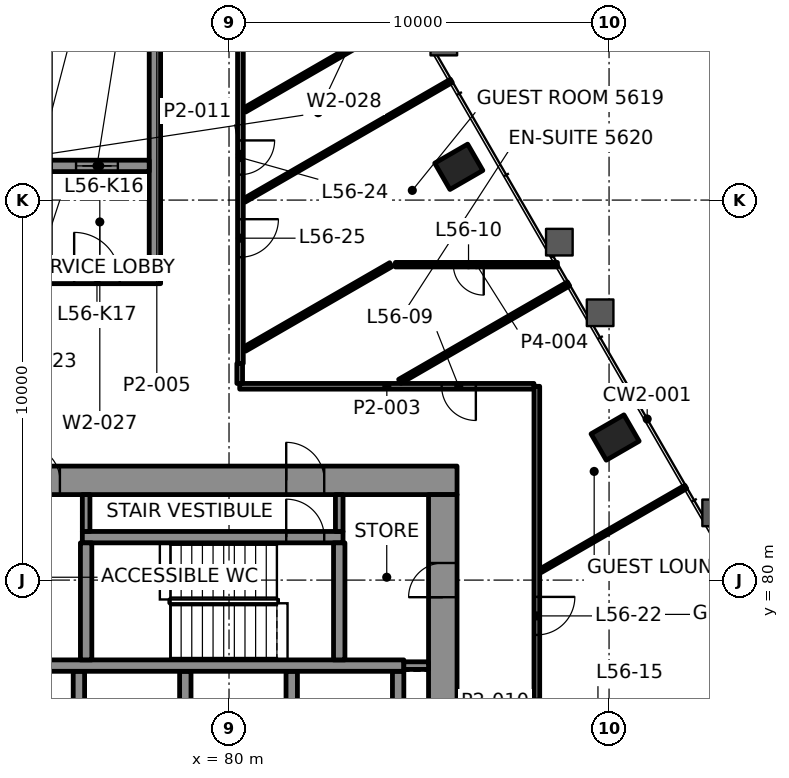
"""IFC4 building model, lengths in metres.
Left out: names, types, materials, properties, quantities, classifications, styles, units other than length and angle.
Written with IfcOpenShell. Run it as: python <this file> out.ifc"""

import sys

from ifc_helpers import new_model, si_unit, direction, frame, frame_2d, origin, origin_2d, place, context, subcontext, project, spatial, rectangle, hollow_rectangle, extrude, element, fill, save


model = new_model("IFC4")
c1 = context("Model", 3, precision=1e-05, world=origin(), true_north=direction((0.0, 1.0)))
c2 = subcontext(c1, "Body", "Model", "MODEL_VIEW")
j1 = project(units=[si_unit("LENGTHUNIT", "METRE"), si_unit("PLANEANGLEUNIT", "RADIAN")], contexts=[c1])
p1 = place(None, origin())
s1 = spatial("IfcSite", under=j1, at=p1, CompositionType="ELEMENT")
p2 = place(p1, origin())
s2 = spatial("IfcBuilding", under=s1, at=p2, CompositionType="ELEMENT")
p3 = place(p2, frame((0.0, 0.0, 237.7)))
s3 = spatial("IfcBuildingStorey", under=s2, at=p3, CompositionType="ELEMENT", Elevation=237.7)
for number, where, z_axis, x_axis in (
    (1, (90.159, 83.752, -0.0), (0.0, 0.0, 1.0), (-0.5, 0.866, 0.0)),
    (2, (86.046, 90.875, -0.0), (0.0, 0.0, 1.0), (-0.5, 0.866, 0.0)),
):
    element("IfcColumn", number, at=place(p3, frame(where, z_axis=z_axis, x_axis=x_axis)), inside=s3, PredefinedType="COLUMN", context=c2, shape_type="SweptSolid", body=[
        extrude(hollow_rectangle(XDim=0.8, YDim=1.0, WallThickness=0.05, at=origin_2d()), origin(), (0.0, 0.0, 1.0), 3.9),
    ])
p4 = place(p3, frame((64.0, 82.625, 0.0), z_axis=(0.0, 0.0, 1.0), x_axis=(1.0, 0.0, 0.0)))
e3 = element("IfcWall", 3, at=p4, inside=s3, PredefinedType="SHEAR", context=c2, shape_type="SweptSolid", body=[
    extrude(rectangle(XDim=22.0, YDim=0.75, at=frame_2d((11.0, 0.0))), origin(), (0.0, 0.0, 1.0), 3.6),
])
p5 = place(p4, frame((3.695, 0.0, 0.0)))
e4 = element("IfcOpeningElement", 4, at=p5, cuts=e3, PredefinedType="OPENING", context=c2, shape_type="SweptSolid", body=[
    extrude(rectangle(XDim=1.0, YDim=2.1, at=frame_2d((0.5, 1.05))), frame((0.0, 0.385, 0.0), z_axis=(0.0, -1.0, 0.0), x_axis=(1.0, 0.0, 0.0)), (0.0, 0.0, 1.0), 0.77),
])
p6 = place(p4, frame((17.505, 0.0, 0.0)))
e5 = element("IfcOpeningElement", 5, at=p6, cuts=e3, PredefinedType="OPENING", context=c2, shape_type="SweptSolid", body=[
    extrude(rectangle(XDim=1.0, YDim=2.1, at=frame_2d((0.5, 1.05))), frame((0.0, 0.385, 0.0), z_axis=(0.0, -1.0, 0.0), x_axis=(1.0, 0.0, 0.0)), (0.0, 0.0, 1.0), 0.77),
])
p7 = place(p4, frame((10.65, 0.0, 0.0)))
e6 = element("IfcOpeningElement", 6, at=p7, cuts=e3, PredefinedType="OPENING", context=c2, shape_type="SweptSolid", body=[
    extrude(rectangle(XDim=0.9, YDim=2.1, at=frame_2d((0.45, 1.05))), frame((0.0, 0.385, 0.0), z_axis=(0.0, -1.0, 0.0), x_axis=(1.0, 0.0, 0.0)), (0.0, 0.0, 1.0), 0.77),
])
p8 = place(p3, frame((85.625, 67.75, 0.0), z_axis=(0.0, 0.0, 1.0), x_axis=(0.0, 1.0, 0.0)))
e7 = element("IfcWall", 7, at=p8, inside=s3, PredefinedType="SHEAR", context=c2, shape_type="SweptSolid", body=[
    extrude(rectangle(XDim=14.5, YDim=0.75, at=frame_2d((7.25, 0.0))), origin(), (0.0, 0.0, 1.0), 3.6),
])
p9 = place(p8, frame((4.65, 0.0, 0.0)))
e8 = element("IfcOpeningElement", 8, at=p9, cuts=e7, PredefinedType="OPENING", context=c2, shape_type="SweptSolid", body=[
    extrude(rectangle(XDim=1.8, YDim=2.1, at=frame_2d((0.9, 1.05))), frame((0.0, 0.385, 0.0), z_axis=(0.0, -1.0, 0.0), x_axis=(1.0, 0.0, 0.0)), (0.0, 0.0, 1.0), 0.77),
])
p10 = place(p8, frame((11.8, 0.0, 0.0)))
e9 = element("IfcOpeningElement", 9, at=p10, cuts=e7, PredefinedType="OPENING", context=c2, shape_type="SweptSolid", body=[
    extrude(rectangle(XDim=0.9, YDim=2.1, at=frame_2d((0.45, 1.05))), frame((0.0, 0.385, 0.0), z_axis=(0.0, -1.0, 0.0), x_axis=(1.0, 0.0, 0.0)), (0.0, 0.0, 1.0), 0.77),
])
for number, where, z_axis, x_axis in (
    (10, (76.05, 75.0, 0.0), (0.0, 0.0, 1.0), (0.0, 1.0, 0.0)),
    (11, (78.85, 75.0, 0.0), (0.0, 0.0, 1.0), (0.0, 1.0, 0.0)),
    (12, (81.65, 75.0, 0.0), (0.0, 0.0, 1.0), (0.0, 1.0, 0.0)),
    (13, (84.45, 75.0, 0.0), (0.0, 0.0, 1.0), (0.0, 1.0, 0.0)),
):
    element("IfcWall", number, at=place(p3, frame(where, z_axis=z_axis, x_axis=x_axis)), inside=s3, PredefinedType="SHEAR", context=c2, shape_type="SweptSolid", body=[
        extrude(rectangle(XDim=2.6, YDim=0.3, at=frame_2d((1.3, 0.0))), origin(), (0.0, 0.0, 1.0), 3.6),
    ])
p11 = place(p3, frame((67.15, 77.75, 0.0), z_axis=(0.0, 0.0, 1.0), x_axis=(1.0, 0.0, 0.0)))
e14 = element("IfcWall", 14, at=p11, inside=s3, PredefinedType="SHEAR", context=c2, shape_type="SweptSolid", body=[
    extrude(rectangle(XDim=17.45, YDim=0.3, at=frame_2d((8.725, 0.0))), origin(), (0.0, 0.0, 1.0), 3.6),
])
p12 = place(p11, frame((0.545, 0.0, 0.0)))
e15 = element("IfcOpeningElement", 15, at=p12, cuts=e14, PredefinedType="OPENING", context=c2, shape_type="SweptSolid", body=[
    extrude(rectangle(XDim=1.0, YDim=2.1, at=frame_2d((0.5, 1.05))), frame((0.0, 0.16, 0.0), z_axis=(0.0, -1.0, 0.0), x_axis=(1.0, 0.0, 0.0)), (0.0, 0.0, 1.0), 0.32),
])
p13 = place(p3, frame((76.14, 81.13, 0.0), z_axis=(0.0, 0.0, 1.0), x_axis=(1.0, 0.0, 0.0)))
e16 = element("IfcWall", 16, at=p13, inside=s3, PredefinedType="SHEAR", context=c2, shape_type="SweptSolid", body=[
    extrude(rectangle(XDim=6.86, YDim=0.3, at=frame_2d((3.43, 0.0))), origin(), (0.0, 0.0, 1.0), 3.6),
])
p14 = place(p13, frame((5.365, 0.0, 0.0)))
e17 = element("IfcOpeningElement", 17, at=p14, cuts=e16, PredefinedType="OPENING", context=c2, shape_type="SweptSolid", body=[
    extrude(rectangle(XDim=1.0, YDim=2.1, at=frame_2d((0.5, 1.05))), frame((0.0, 0.16, 0.0), z_axis=(0.0, -1.0, 0.0), x_axis=(1.0, 0.0, 0.0)), (0.0, 0.0, 1.0), 0.32),
])
for number, where, z_axis, x_axis in (
    (18, (76.24, 77.9, 0.0), (0.0, 0.0, 1.0), (0.0, 1.0, 0.0)),
    (19, (82.9, 77.9, 0.0), (0.0, 0.0, 1.0), (0.0, 1.0, 0.0)),
):
    element("IfcWall", number, at=place(p3, frame(where, z_axis=z_axis, x_axis=x_axis)), inside=s3, PredefinedType="SHEAR", context=c2, shape_type="SweptSolid", body=[
        extrude(rectangle(XDim=3.08, YDim=0.3, at=frame_2d((1.54, 0.0))), origin(), (0.0, 0.0, 1.0), 3.6),
    ])
p15 = place(p3, frame((71.8, 87.95, 0.0), z_axis=(0.0, 0.0, 1.0), x_axis=(1.0, 0.0, 0.0)))
e20 = element("IfcWall", 20, at=p15, inside=s3, PredefinedType="SHEAR", context=c2, shape_type="SweptSolid", body=[
    extrude(rectangle(XDim=6.4, YDim=0.3, at=frame_2d((3.2, 0.0))), origin(), (0.0, 0.0, 1.0), 3.6),
])
p16 = place(p15, frame((1.325, 0.0, 0.0)))
e21 = element("IfcOpeningElement", 21, at=p16, cuts=e20, PredefinedType="OPENING", context=c2, shape_type="SweptSolid", body=[
    extrude(rectangle(XDim=1.0, YDim=2.1, at=frame_2d((0.5, 1.05))), frame((0.0, 0.16, 0.0), z_axis=(0.0, -1.0, 0.0), x_axis=(1.0, 0.0, 0.0)), (0.0, 0.0, 1.0), 0.32),
])
p17 = place(p15, frame((4.125, 0.0, 0.0)))
e22 = element("IfcOpeningElement", 22, at=p17, cuts=e20, PredefinedType="OPENING", context=c2, shape_type="SweptSolid", body=[
    extrude(rectangle(XDim=1.2, YDim=2.1, at=frame_2d((0.6, 1.05))), frame((0.0, 0.16, 0.0), z_axis=(0.0, -1.0, 0.0), x_axis=(1.0, 0.0, 0.0)), (0.0, 0.0, 1.0), 0.32),
])
p18 = place(p3, frame((78.05, 88.1, 0.0), z_axis=(0.0, 0.0, 1.0), x_axis=(0.0, 1.0, 0.0)))
e23 = element("IfcWall", 23, at=p18, inside=s3, PredefinedType="SHEAR", context=c2, shape_type="SweptSolid", body=[
    extrude(rectangle(XDim=6.2, YDim=0.3, at=frame_2d((3.1, 0.0))), origin(), (0.0, 0.0, 1.0), 3.6),
])
p19 = place(p3, frame((75.3, 90.9, 0.0), z_axis=(0.0, 0.0, 1.0), x_axis=(1.0, 0.0, 0.0)))
e24 = element("IfcWall", 24, at=p19, inside=s3, PredefinedType="SHEAR", context=c2, shape_type="SweptSolid", body=[
    extrude(rectangle(XDim=2.6, YDim=0.3, at=frame_2d((1.3, 0.0))), origin(), (0.0, 0.0, 1.0), 3.6),
])
p20 = place(p19, frame((0.675, 0.0, 0.0)))
e25 = element("IfcOpeningElement", 25, at=p20, cuts=e24, PredefinedType="OPENING", context=c2, shape_type="SweptSolid", body=[
    extrude(rectangle(XDim=1.1, YDim=2.1, at=frame_2d((0.55, 1.05))), frame((0.0, 0.16, 0.0), z_axis=(0.0, -1.0, 0.0), x_axis=(1.0, 0.0, 0.0)), (0.0, 0.0, 1.0), 0.32),
])
p21 = place(p3, frame((88.024, 85.1, 0.0), z_axis=(0.0, 0.0, 1.0), x_axis=(-1.0, 0.0, 0.0)))
e26 = element("IfcWall", 26, at=p21, inside=s3, PredefinedType="PARTITIONING", context=c2, shape_type="SweptSolid", body=[
    extrude(rectangle(XDim=7.744, YDim=0.15, at=frame_2d((3.872, 0.0))), origin(), (0.0, 0.0, 1.0), 3.0),
])
p22 = place(p21, frame((1.53, 0.0, 0.0)))
e27 = element("IfcOpeningElement", 27, at=p22, cuts=e26, PredefinedType="OPENING", context=c2, shape_type="SweptSolid", body=[
    extrude(rectangle(XDim=0.9, YDim=2.1, at=frame_2d((0.45, 1.05))), frame((0.0, 0.085, 0.0), z_axis=(0.0, -1.0, 0.0), x_axis=(1.0, 0.0, 0.0)), (0.0, 0.0, 1.0), 0.17),
])
p23 = place(p3, frame((88.642, 88.3, 0.0), z_axis=(0.0, 0.0, 1.0), x_axis=(-1.0, 0.0, 0.0)))
e28 = element("IfcWall", 28, at=p23, inside=s3, PredefinedType="PARTITIONING", context=c2, shape_type="SweptSolid", body=[
    extrude(rectangle(XDim=4.263, YDim=0.12, at=frame_2d((2.132, 0.0))), origin(), (0.0, 0.0, 1.0), 2.922),
])
p24 = place(p23, frame((1.939, 0.0, 0.0)))
e29 = element("IfcOpeningElement", 29, at=p24, cuts=e28, PredefinedType="OPENING", context=c2, shape_type="SweptSolid", body=[
    extrude(rectangle(XDim=0.8, YDim=2.1, at=frame_2d((0.4, 1.05))), frame((0.0, 0.07, 0.0), z_axis=(0.0, -1.0, 0.0), x_axis=(1.0, 0.0, 0.0)), (0.0, 0.0, 1.0), 0.14),
])
p25 = place(p3, frame((88.201, 80.248, 0.0), z_axis=(0.0, 0.0, 1.0), x_axis=(0.866050012359, 0.499957374277, 0.0)))
e30 = element("IfcWall", 30, at=p25, inside=s3, PredefinedType="PARTITIONING", context=c2, shape_type="SweptSolid", body=[
    extrude(rectangle(XDim=4.408, YDim=0.1, at=frame_2d((2.204, 0.0))), origin(), (0.0, 0.0, 1.0), 2.922),
])
p26 = place(p3, frame((84.493, 85.23, 0.0), z_axis=(0.0, 0.0, 1.0), x_axis=(0.866034146242, 0.499984857314, 0.0)))
e31 = element("IfcWall", 31, at=p26, inside=s3, PredefinedType="PARTITIONING", context=c2, shape_type="SweptSolid", body=[
    extrude(rectangle(XDim=5.128, YDim=0.12, at=frame_2d((2.564, 0.0))), origin(), (0.0, 0.0, 1.0), 2.922),
])
p27 = place(p3, frame((80.41, 86.078, 0.0), z_axis=(0.0, 0.0, 1.0), x_axis=(0.866033721197, 0.499985593543, 0.0)))
e32 = element("IfcWall", 32, at=p27, inside=s3, PredefinedType="PARTITIONING", context=c2, shape_type="SweptSolid", body=[
    extrude(rectangle(XDim=4.444, YDim=0.12, at=frame_2d((2.222, 0.0))), origin(), (0.0, 0.0, 1.0), 3.0),
])
p28 = place(p3, frame((80.401, 89.991, 0.0), z_axis=(0.0, 0.0, 1.0), x_axis=(0.86602790099, 0.499995674689, 0.0)))
e33 = element("IfcWall", 33, at=p28, inside=s3, PredefinedType="PARTITIONING", context=c2, shape_type="SweptSolid", body=[
    extrude(rectangle(XDim=6.291, YDim=0.1, at=frame_2d((3.146, 0.0))), origin(), (0.0, 0.0, 1.0), 2.922),
])
p29 = place(p3, frame((80.41, 92.37, 0.0), z_axis=(0.0, 0.0, 1.0), x_axis=(0.866028357664, 0.499994883695, 0.0)))
e34 = element("IfcWall", 34, at=p29, inside=s3, PredefinedType="PARTITIONING", context=c2, shape_type="SweptSolid", body=[
    extrude(rectangle(XDim=3.568, YDim=0.12, at=frame_2d((1.784, 0.0))), origin(), (0.0, 0.0, 1.0), 3.0),
])
p30 = place(p3, frame((88.1, 85.1, 0.0), z_axis=(0.0, 0.0, 1.0), x_axis=(0.0, -1.0, 0.0)))
e35 = element("IfcWall", 35, at=p30, inside=s3, PredefinedType="PARTITIONING", context=c2, shape_type="SweptSolid", body=[
    extrude(rectangle(XDim=16.624, YDim=0.15, at=frame_2d((8.312, 0.0))), origin(), (0.0, 0.0, 1.0), 3.0),
])
p31 = place(p30, frame((5.542, 0.0, 0.0)))
e36 = element("IfcOpeningElement", 36, at=p31, cuts=e35, PredefinedType="OPENING", context=c2, shape_type="SweptSolid", body=[
    extrude(rectangle(XDim=1.0, YDim=2.1, at=frame_2d((0.5, 1.05))), frame((0.0, 0.085, 0.0), z_axis=(0.0, -1.0, 0.0), x_axis=(1.0, 0.0, 0.0)), (0.0, 0.0, 1.0), 0.17),
])
p32 = place(p30, frame((14.558, 0.0, 0.0)))
e37 = element("IfcOpeningElement", 37, at=p32, cuts=e35, PredefinedType="OPENING", context=c2, shape_type="SweptSolid", body=[
    extrude(rectangle(XDim=1.0, YDim=2.1, at=frame_2d((0.5, 1.05))), frame((0.0, 0.085, 0.0), z_axis=(0.0, -1.0, 0.0), x_axis=(1.0, 0.0, 0.0)), (0.0, 0.0, 1.0), 0.17),
])
p33 = place(p3, frame((80.3, 96.699, 0.0), z_axis=(0.0, 0.0, 1.0), x_axis=(0.0, -1.0, 0.0)))
e38 = element("IfcWall", 38, at=p33, inside=s3, PredefinedType="PARTITIONING", context=c2, shape_type="SweptSolid", body=[
    extrude(rectangle(XDim=10.999, YDim=0.15, at=frame_2d((5.5, 0.0))), origin(), (0.0, 0.0, 1.0), 3.0),
])
p34 = place(p33, frame((5.129, 0.0, 0.0)))
e39 = element("IfcOpeningElement", 39, at=p34, cuts=e38, PredefinedType="OPENING", context=c2, shape_type="SweptSolid", body=[
    extrude(rectangle(XDim=0.9, YDim=2.1, at=frame_2d((0.45, 1.05))), frame((0.0, 0.085, 0.0), z_axis=(0.0, -1.0, 0.0), x_axis=(1.0, 0.0, 0.0)), (0.0, 0.0, 1.0), 0.17),
])
p35 = place(p33, frame((7.202, 0.0, 0.0)))
e40 = element("IfcOpeningElement", 40, at=p35, cuts=e38, PredefinedType="OPENING", context=c2, shape_type="SweptSolid", body=[
    extrude(rectangle(XDim=1.0, YDim=2.1, at=frame_2d((0.5, 1.05))), frame((0.0, 0.085, 0.0), z_axis=(0.0, -1.0, 0.0), x_axis=(1.0, 0.0, 0.0)), (0.0, 0.0, 1.0), 0.17),
])
p36 = place(p3, frame((80.281, 85.175, 0.0), z_axis=(0.0, 0.0, 1.0), x_axis=(0.0, 1.0, 0.0)))
e41 = element("IfcWall", 41, at=p36, inside=s3, PredefinedType="PARTITIONING", context=c2, shape_type="SweptSolid", body=[
    extrude(rectangle(XDim=0.525, YDim=0.15, at=frame_2d((0.262, 0.0))), origin(), (0.0, 0.0, 1.0), 3.0),
])
p37 = place(p3, frame((84.6, 77.75, 0.0), z_axis=(0.0, 0.0, 1.0), x_axis=(1.0, 0.0, 0.0)))
e42 = element("IfcWall", 42, at=p37, inside=s3, PredefinedType="PARTITIONING", context=c2, shape_type="SweptSolid", body=[
    extrude(rectangle(XDim=0.65, YDim=0.2, at=frame_2d((0.325, 0.0))), origin(), (0.0, 0.0, 1.0), 3.6),
])
for number, where, z_axis, x_axis in (
    (43, (76.24, 81.28, 0.0), (0.0, 0.0, 1.0), (0.0, 1.0, 0.0)),
    (44, (82.9, 81.28, 0.0), (0.0, 0.0, 1.0), (0.0, 1.0, 0.0)),
):
    element("IfcWall", number, at=place(p3, frame(where, z_axis=z_axis, x_axis=x_axis)), inside=s3, PredefinedType="PARTITIONING", context=c2, shape_type="SweptSolid", body=[
        extrude(rectangle(XDim=0.97, YDim=0.2, at=frame_2d((0.485, 0.0))), origin(), (0.0, 0.0, 1.0), 3.6),
    ])
p38 = place(p22, origin())
e45 = element("IfcDoor", 45, at=p38, inside=s3, OperationType="SINGLE_SWING_RIGHT", PredefinedType="DOOR", context=c2, shape_type="SweptSolid", body=[
    extrude(rectangle(XDim=0.9, YDim=2.1, at=frame_2d((0.45, 1.05))), frame((0.0, 0.025, 0.0), z_axis=(0.0, -1.0, 0.0), x_axis=(1.0, 0.0, 0.0)), (0.0, 0.0, 1.0), 0.05),
])
fill(e27, e45)
p39 = place(p24, origin())
e46 = element("IfcDoor", 46, at=p39, inside=s3, OperationType="SINGLE_SWING_RIGHT", PredefinedType="DOOR", context=c2, shape_type="SweptSolid", body=[
    extrude(rectangle(XDim=0.8, YDim=2.1, at=frame_2d((0.4, 1.05))), frame((0.0, 0.025, 0.0), z_axis=(0.0, -1.0, 0.0), x_axis=(1.0, 0.0, 0.0)), (0.0, 0.0, 1.0), 0.05),
])
fill(e29, e46)
p40 = place(p31, origin())
e47 = element("IfcDoor", 47, at=p40, inside=s3, OperationType="SINGLE_SWING_RIGHT", PredefinedType="DOOR", context=c2, shape_type="SweptSolid", body=[
    extrude(rectangle(XDim=1.0, YDim=2.1, at=frame_2d((0.5, 1.05))), frame((0.0, 0.025, 0.0), z_axis=(0.0, -1.0, 0.0), x_axis=(1.0, 0.0, 0.0)), (0.0, 0.0, 1.0), 0.05),
])
fill(e36, e47)
p41 = place(p34, origin())
e48 = element("IfcDoor", 48, at=p41, inside=s3, OperationType="SINGLE_SWING_LEFT", PredefinedType="DOOR", context=c2, shape_type="SweptSolid", body=[
    extrude(rectangle(XDim=0.9, YDim=2.1, at=frame_2d((0.45, 1.05))), frame((0.0, 0.025, 0.0), z_axis=(0.0, -1.0, 0.0), x_axis=(1.0, 0.0, 0.0)), (0.0, 0.0, 1.0), 0.05),
])
fill(e39, e48)
p42 = place(p35, origin())
e49 = element("IfcDoor", 49, at=p42, inside=s3, OperationType="SINGLE_SWING_LEFT", PredefinedType="DOOR", context=c2, shape_type="SweptSolid", body=[
    extrude(rectangle(XDim=1.0, YDim=2.1, at=frame_2d((0.5, 1.05))), frame((0.0, 0.025, 0.0), z_axis=(0.0, -1.0, 0.0), x_axis=(1.0, 0.0, 0.0)), (0.0, 0.0, 1.0), 0.05),
])
fill(e40, e49)
p43 = place(p20, origin())
e50 = element("IfcDoor", 50, at=p43, inside=s3, OperationType="DOUBLE_DOOR_SLIDING", PredefinedType="DOOR", context=c2, shape_type="SweptSolid", body=[
    extrude(rectangle(XDim=1.1, YDim=2.1, at=frame_2d((0.55, 1.05))), frame((0.0, 0.025, 0.0), z_axis=(0.0, -1.0, 0.0), x_axis=(1.0, 0.0, 0.0)), (0.0, 0.0, 1.0), 0.05),
])
fill(e25, e50)
p44 = place(p14, origin())
e51 = element("IfcDoor", 51, at=p44, inside=s3, OperationType="SINGLE_SWING_RIGHT", PredefinedType="DOOR", context=c2, shape_type="SweptSolid", body=[
    extrude(rectangle(XDim=1.0, YDim=2.1, at=frame_2d((0.5, 1.05))), frame((0.0, 0.025, 0.0), z_axis=(0.0, -1.0, 0.0), x_axis=(1.0, 0.0, 0.0)), (0.0, 0.0, 1.0), 0.05),
])
fill(e17, e51)
p45 = place(p6, origin())
e52 = element("IfcDoor", 52, at=p45, inside=s3, OperationType="SINGLE_SWING_LEFT", PredefinedType="DOOR", context=c2, shape_type="SweptSolid", body=[
    extrude(rectangle(XDim=1.0, YDim=2.1, at=frame_2d((0.5, 1.05))), frame((0.0, 0.095, 0.0), z_axis=(0.0, -1.0, 0.0), x_axis=(1.0, 0.0, 0.0)), (0.0, 0.0, 1.0), 0.19),
])
fill(e5, e52)
p46 = place(p17, origin())
e53 = element("IfcDoor", 53, at=p46, inside=s3, OperationType="SINGLE_SWING_RIGHT", PredefinedType="DOOR", context=c2, shape_type="SweptSolid", body=[
    extrude(rectangle(XDim=1.2, YDim=2.1, at=frame_2d((0.6, 1.05))), frame((0.0, 0.025, 0.0), z_axis=(0.0, -1.0, 0.0), x_axis=(1.0, 0.0, 0.0)), (0.0, 0.0, 1.0), 0.05),
])
fill(e22, e53)
p47 = place(p7, origin())
e54 = element("IfcDoor", 54, at=p47, inside=s3, OperationType="SINGLE_SWING_LEFT", PredefinedType="DOOR", context=c2, shape_type="SweptSolid", body=[
    extrude(rectangle(XDim=0.9, YDim=2.1, at=frame_2d((0.45, 1.05))), frame((0.0, 0.095, 0.0), z_axis=(0.0, -1.0, 0.0), x_axis=(1.0, 0.0, 0.0)), (0.0, 0.0, 1.0), 0.19),
])
fill(e6, e54)
p48 = place(p10, origin())
e55 = element("IfcDoor", 55, at=p48, inside=s3, OperationType="SINGLE_SWING_RIGHT", PredefinedType="DOOR", context=c2, shape_type="SweptSolid", body=[
    extrude(rectangle(XDim=0.9, YDim=2.1, at=frame_2d((0.45, 1.05))), frame((0.0, 0.095, 0.0), z_axis=(0.0, -1.0, 0.0), x_axis=(1.0, 0.0, 0.0)), (0.0, 0.0, 1.0), 0.19),
])
fill(e9, e55)
save(model, sys.argv[1])
